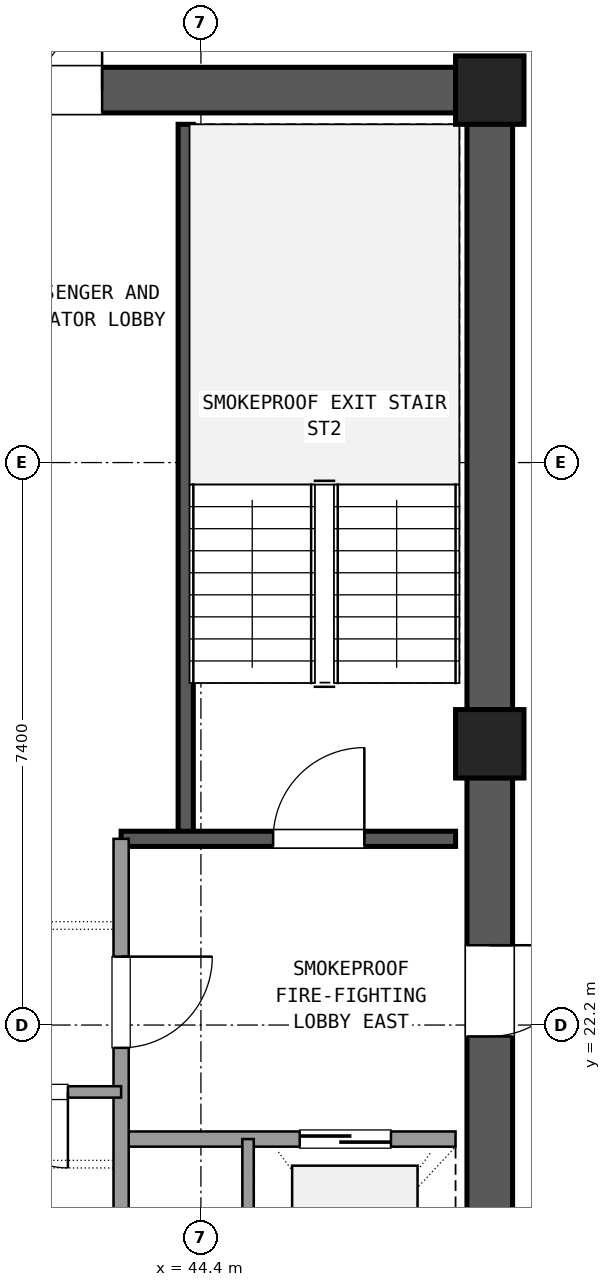
"""IFC4 building model, lengths in metres.
Left out: names, types, materials, properties, quantities, classifications, styles, units other than length and angle.
Written with IfcOpenShell. Run it as: python <this file> out.ifc"""

import sys

from ifc_helpers import new_model, si_unit, direction, frame, frame_2d, origin, origin_2d, place, context, subcontext, project, spatial, rectangle, extrude, element, fill, save


model = new_model("IFC4")
c1 = context("Model", 3, precision=1e-05, world=origin(), true_north=direction((0.0, 1.0)))
c2 = subcontext(c1, "Body", "Model", "MODEL_VIEW")
j1 = project(units=[si_unit("LENGTHUNIT", "METRE"), si_unit("PLANEANGLEUNIT", "RADIAN")], contexts=[c1])
p1 = place(None, origin())
s1 = spatial("IfcSite", under=j1, at=p1, CompositionType="ELEMENT")
p2 = place(p1, origin())
s2 = spatial("IfcBuilding", under=s1, at=p2, CompositionType="ELEMENT")
p3 = place(p2, frame((0.0, 0.0, 253.62)))
s3 = spatial("IfcBuildingStorey", under=s2, at=p3, CompositionType="ELEMENT", Elevation=253.62)
for number, where, z_axis, x_axis in (
    (1, (48.2, 25.9, 0.0), (0.0, 0.0, 1.0), (1.0, 0.0, 0.0)),
    (2, (48.2, 34.5, 0.0), (0.0, 0.0, 1.0), (1.0, 0.0, 0.0)),
):
    element("IfcColumn", number, at=place(p3, frame(where, z_axis=z_axis, x_axis=x_axis)), inside=s3, PredefinedType="COLUMN", context=c2, shape_type="SweptSolid", body=[
        extrude(rectangle(XDim=0.9, YDim=0.9, at=origin_2d()), origin(), (0.0, 0.0, 1.0), 3.6),
    ])
p4 = place(p3, frame((48.2, 17.745, 0.0), z_axis=(0.0, 0.0, 1.0), x_axis=(0.0, 1.0, 0.0)))
e3 = element("IfcWall", 3, at=p4, inside=s3, PredefinedType="SHEAR", context=c2, shape_type="SweptSolid", body=[
    extrude(rectangle(XDim=7.71, YDim=0.6, at=frame_2d((3.855, 0.0))), origin(), (0.0, 0.0, 1.0), 3.32),
])
p5 = place(p4, frame((4.305, 0.0, 0.0)))
e4 = element("IfcOpeningElement", 4, at=p5, cuts=e3, PredefinedType="OPENING", context=c2, shape_type="SweptSolid", body=[
    extrude(rectangle(XDim=1.2, YDim=2.15, at=frame_2d((0.6, 1.075))), frame((0.0, 0.31, 0.0), z_axis=(0.0, -1.0, 0.0), x_axis=(1.0, 0.0, 0.0)), (0.0, 0.0, 1.0), 0.62),
])
p6 = place(p3, frame((48.2, 26.345, 0.0), z_axis=(0.0, 0.0, 1.0), x_axis=(0.0, 1.0, 0.0)))
e5 = element("IfcWall", 5, at=p6, inside=s3, PredefinedType="SHEAR", context=c2, shape_type="SweptSolid", body=[
    extrude(rectangle(XDim=7.71, YDim=0.6, at=frame_2d((3.855, 0.0))), origin(), (0.0, 0.0, 1.0), 3.32),
])
p7 = place(p3, frame((47.755, 34.5, 0.0), z_axis=(0.0, 0.0, 1.0), x_axis=(-1.0, 0.0, 0.0)))
e6 = element("IfcWall", 6, at=p7, inside=s3, PredefinedType="SHEAR", context=c2, shape_type="SweptSolid", body=[
    extrude(rectangle(XDim=10.31, YDim=0.6, at=frame_2d((5.155, 0.0))), origin(), (0.0, 0.0, 1.0), 3.32),
])
p8 = place(p7, frame((4.655, 0.0, 0.0)))
e7 = element("IfcOpeningElement", 7, at=p8, cuts=e6, PredefinedType="OPENING", context=c2, shape_type="SweptSolid", body=[
    extrude(rectangle(XDim=1.6, YDim=2.2, at=frame_2d((0.8, 1.1))), frame((0.0, 0.31, 0.0), z_axis=(0.0, -1.0, 0.0), x_axis=(1.0, 0.0, 0.0)), (0.0, 0.0, 1.0), 0.62),
])
p9 = place(p3, frame((44.2, 24.65, 0.0), z_axis=(0.0, 0.0, 1.0), x_axis=(0.0, 1.0, 0.0)))
e8 = element("IfcWall", 8, at=p9, inside=s3, PredefinedType="SHEAR", context=c2, shape_type="SweptSolid", body=[
    extrude(rectangle(XDim=9.4, YDim=0.2, at=frame_2d((4.7, 0.0))), origin(), (0.0, 0.0, 1.0), 3.32),
])
p10 = place(p3, frame((43.35, 24.65, 0.0), z_axis=(0.0, 0.0, 1.0), x_axis=(1.0, 0.0, 0.0)))
e9 = element("IfcWall", 9, at=p10, inside=s3, PredefinedType="SHEAR", context=c2, shape_type="SweptSolid", body=[
    extrude(rectangle(XDim=4.4, YDim=0.2, at=frame_2d((2.2, 0.0))), origin(), (0.0, 0.0, 1.0), 3.32),
])
p11 = place(p10, frame((2.0, 0.0, 0.0)))
e10 = element("IfcOpeningElement", 10, at=p11, cuts=e9, PredefinedType="OPENING", context=c2, shape_type="SweptSolid", body=[
    extrude(rectangle(XDim=1.2, YDim=2.15, at=frame_2d((0.6, 1.075))), frame((0.0, 0.11, 0.0), z_axis=(0.0, -1.0, 0.0), x_axis=(1.0, 0.0, 0.0)), (0.0, 0.0, 1.0), 0.22),
])
p12 = place(p3, frame((43.35, 20.7, 0.0), z_axis=(0.0, 0.0, 1.0), x_axis=(1.0, 0.0, 0.0)))
e11 = element("IfcWall", 11, at=p12, inside=s3, PredefinedType="SOLIDWALL", context=c2, shape_type="SweptSolid", body=[
    extrude(rectangle(XDim=4.4, YDim=0.2, at=frame_2d((2.2, 0.0))), origin(), (0.0, 0.0, 1.0), 2.61),
])
p13 = place(p12, frame((2.35, 0.0, 0.0)))
e12 = element("IfcOpeningElement", 12, at=p13, cuts=e11, PredefinedType="OPENING", context=c2, shape_type="SweptSolid", body=[
    extrude(rectangle(XDim=1.2, YDim=2.15, at=frame_2d((0.6, 1.075))), frame((0.0, 0.11, 0.0), z_axis=(0.0, -1.0, 0.0), x_axis=(1.0, 0.0, 0.0)), (0.0, 0.0, 1.0), 0.22),
])
p14 = place(p3, frame((43.35, 17.75, 0.0), z_axis=(0.0, 0.0, 1.0), x_axis=(0.0, 1.0, 0.0)))
e13 = element("IfcWall", 13, at=p14, inside=s3, PredefinedType="SOLIDWALL", context=c2, shape_type="SweptSolid", body=[
    extrude(rectangle(XDim=6.9, YDim=0.2, at=frame_2d((3.45, 0.0))), origin(), (0.0, 0.0, 1.0), 2.61),
])
p15 = place(p14, frame((4.15, 0.0, 0.0)))
e14 = element("IfcOpeningElement", 14, at=p15, cuts=e13, PredefinedType="OPENING", context=c2, shape_type="SweptSolid", body=[
    extrude(rectangle(XDim=1.2, YDim=2.15, at=frame_2d((0.6, 1.075))), frame((0.0, 0.11, 0.0), z_axis=(0.0, -1.0, 0.0), x_axis=(1.0, 0.0, 0.0)), (0.0, 0.0, 1.0), 0.22),
])
p16 = place(p3, frame((45.02, 17.75, 0.0), z_axis=(0.0, 0.0, 1.0), x_axis=(0.0, 1.0, 0.0)))
e15 = element("IfcWall", 15, at=p16, inside=s3, PredefinedType="PARTITIONING", context=c2, shape_type="SweptSolid", body=[
    extrude(rectangle(XDim=2.95, YDim=0.15, at=frame_2d((1.475, 0.0))), origin(), (0.0, 0.0, 1.0), 2.61),
])
p17 = place(p3, frame((37.25, 21.32, 0.0), z_axis=(0.0, 0.0, 1.0), x_axis=(1.0, 0.0, 0.0)))
e16 = element("IfcWall", 16, at=p17, inside=s3, PredefinedType="PARTITIONING", context=c2, shape_type="SweptSolid", body=[
    extrude(rectangle(XDim=6.1, YDim=0.15, at=frame_2d((3.05, 0.0))), origin(), (0.0, 0.0, 1.0), 2.61),
])
p18 = place(p17, frame((0.55, 0.0, 0.0)))
e17 = element("IfcOpeningElement", 17, at=p18, cuts=e16, PredefinedType="OPENING", context=c2, shape_type="SweptSolid", body=[
    extrude(rectangle(XDim=1.0, YDim=2.15, at=frame_2d((0.5, 1.075))), frame((0.0, 0.085, 0.0), z_axis=(0.0, -1.0, 0.0), x_axis=(1.0, 0.0, 0.0)), (0.0, 0.0, 1.0), 0.17),
])
p19 = place(p17, frame((4.4, 0.0, 0.0)))
e18 = element("IfcOpeningElement", 18, at=p19, cuts=e16, PredefinedType="OPENING", context=c2, shape_type="SweptSolid", body=[
    extrude(rectangle(XDim=1.0, YDim=2.15, at=frame_2d((0.5, 1.075))), frame((0.0, 0.085, 0.0), z_axis=(0.0, -1.0, 0.0), x_axis=(1.0, 0.0, 0.0)), (0.0, 0.0, 1.0), 0.17),
])
p20 = place(p11, origin())
e19 = element("IfcDoor", 19, at=p20, inside=s3, OperationType="SINGLE_SWING_RIGHT", PredefinedType="DOOR", context=c2, shape_type="SweptSolid", body=[
    extrude(rectangle(XDim=1.2, YDim=2.15, at=frame_2d((0.6, 1.075))), frame((0.0, 0.025, 0.0), z_axis=(0.0, -1.0, 0.0), x_axis=(1.0, 0.0, 0.0)), (0.0, 0.0, 1.0), 0.05),
])
fill(e10, e19)
p21 = place(p13, origin())
e20 = element("IfcDoor", 20, at=p21, inside=s3, OperationType="SLIDING_TO_RIGHT", PredefinedType="DOOR", context=c2, shape_type="SweptSolid", body=[
    extrude(rectangle(XDim=1.2, YDim=2.15, at=frame_2d((0.6, 1.075))), frame((0.0, 0.025, 0.0), z_axis=(0.0, -1.0, 0.0), x_axis=(1.0, 0.0, 0.0)), (0.0, 0.0, 1.0), 0.05),
])
fill(e12, e20)
p22 = place(p15, frame((1.2, 0.0, 0.0), z_axis=(0.0, 0.0, 1.0), x_axis=(-1.0, 0.0, 0.0)))
e21 = element("IfcDoor", 21, at=p22, inside=s3, OperationType="SINGLE_SWING_RIGHT", PredefinedType="DOOR", context=c2, shape_type="SweptSolid", body=[
    extrude(rectangle(XDim=1.2, YDim=2.15, at=frame_2d((0.6, 1.075))), frame((0.0, 0.025, 0.0), z_axis=(0.0, -1.0, 0.0), x_axis=(1.0, 0.0, 0.0)), (0.0, 0.0, 1.0), 0.05),
])
fill(e14, e21)
p23 = place(p5, frame((1.2, 0.0, 0.0), z_axis=(0.0, 0.0, 1.0), x_axis=(-1.0, 0.0, 0.0)))
e22 = element("IfcDoor", 22, at=p23, inside=s3, OperationType="SINGLE_SWING_RIGHT", PredefinedType="DOOR", context=c2, shape_type="SweptSolid", body=[
    extrude(rectangle(XDim=1.2, YDim=2.15, at=frame_2d((0.6, 1.075))), frame((0.0, 0.025, 0.0), z_axis=(0.0, -1.0, 0.0), x_axis=(1.0, 0.0, 0.0)), (0.0, 0.0, 1.0), 0.05),
])
fill(e4, e22)
p24 = place(p8, frame((1.6, 0.0, 0.0), z_axis=(0.0, 0.0, 1.0), x_axis=(-1.0, 0.0, 0.0)))
e23 = element("IfcDoor", 23, at=p24, inside=s3, OperationType="DOUBLE_DOOR_SINGLE_SWING", PredefinedType="DOOR", context=c2, shape_type="SweptSolid", body=[
    extrude(rectangle(XDim=1.6, YDim=2.2, at=frame_2d((0.8, 1.1))), frame((0.0, 0.025, 0.0), z_axis=(0.0, -1.0, 0.0), x_axis=(1.0, 0.0, 0.0)), (0.0, 0.0, 1.0), 0.05),
])
fill(e7, e23)
p25 = place(p19, frame((1.0, 0.0, 0.0), z_axis=(0.0, 0.0, 1.0), x_axis=(-1.0, 0.0, 0.0)))
e24 = element("IfcDoor", 24, at=p25, inside=s3, OperationType="SINGLE_SWING_RIGHT", PredefinedType="DOOR", context=c2, shape_type="SweptSolid", body=[
    extrude(rectangle(XDim=1.0, YDim=2.15, at=frame_2d((0.5, 1.075))), frame((0.0, 0.025, 0.0), z_axis=(0.0, -1.0, 0.0), x_axis=(1.0, 0.0, 0.0)), (0.0, 0.0, 1.0), 0.05),
])
fill(e18, e24)
save(model, sys.argv[1])
